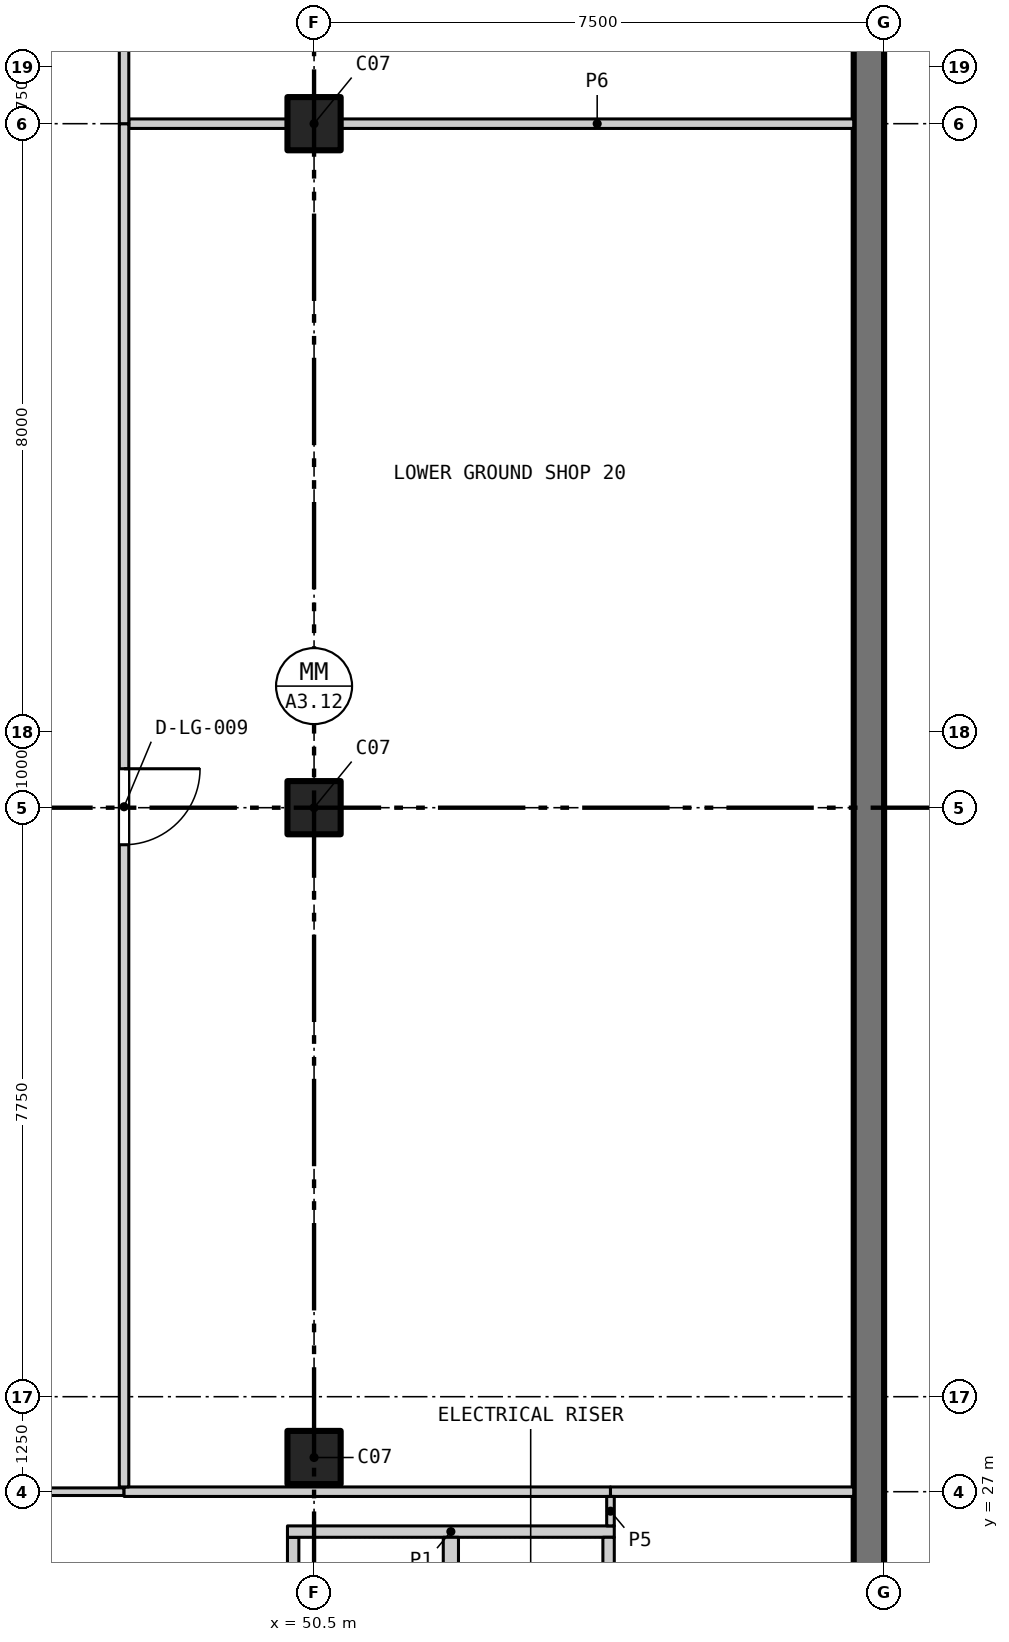
"""IFC4 building model, lengths in metres.
Left out: names, types, materials, properties, quantities, classifications, styles, units other than length and angle.
Written with IfcOpenShell. Run it as: python <this file> out.ifc"""

import sys

from ifc_helpers import new_model, si_unit, direction, frame, frame_2d, origin, origin_2d, place, context, subcontext, project, spatial, rectangle, extrude, element, fill, save


model = new_model("IFC4")
c1 = context("Model", 3, precision=1e-05, world=origin(), true_north=direction((0.0, 1.0)))
c2 = subcontext(c1, "Body", "Model", "MODEL_VIEW")
j1 = project(units=[si_unit("LENGTHUNIT", "METRE"), si_unit("PLANEANGLEUNIT", "RADIAN")], contexts=[c1])
p1 = place(None, origin())
s1 = spatial("IfcSite", under=j1, at=p1, CompositionType="ELEMENT")
p2 = place(p1, origin())
s2 = spatial("IfcBuilding", under=s1, at=p2, CompositionType="ELEMENT")
p3 = place(p2, frame((0.0, 0.0, -5.0)))
s3 = spatial("IfcBuildingStorey", under=s2, at=p3, CompositionType="ELEMENT", Elevation=-5.0)
for number, where, z_axis, x_axis in (
    (1, (50.5, 27.45, 0.0), (0.0, 0.0, 1.0), (1.0, 0.0, 0.0)),
    (2, (50.5, 36.0, 0.0), (0.0, 0.0, 1.0), (1.0, 0.0, 0.0)),
    (3, (50.5, 45.0, 0.0), (0.0, 0.0, 1.0), (1.0, 0.0, 0.0)),
):
    element("IfcColumn", number, at=place(p3, frame(where, z_axis=z_axis, x_axis=x_axis)), inside=s3, PredefinedType="COLUMN", context=c2, shape_type="SweptSolid", body=[
        extrude(rectangle(XDim=0.7, YDim=0.7, at=origin_2d()), origin(), (0.0, 0.0, 1.0), 5.0),
    ])
p4 = place(p3, frame((57.8, 18.0, 0.0), z_axis=(0.0, 0.0, 1.0), x_axis=(0.0, 1.0, 0.0)))
e4 = element("IfcWall", 4, at=p4, inside=s3, PredefinedType="SOLIDWALL", context=c2, shape_type="SweptSolid", body=[
    extrude(rectangle(XDim=108.0, YDim=0.4, at=frame_2d((54.0, 0.0))), origin(), (0.0, 0.0, 1.0), 5.0),
])
p5 = place(p3, frame((50.225, 24.4, 0.0), z_axis=(0.0, 0.0, 1.0), x_axis=(0.0, 1.0, 0.0)))
e5 = element("IfcWall", 5, at=p5, inside=s3, PredefinedType="PARTITIONING", context=c2, shape_type="SweptSolid", body=[
    extrude(rectangle(XDim=2.0, YDim=0.15, at=frame_2d((1.0, 0.0))), origin(), (0.0, 0.0, 1.0), 4.7),
])
p6 = place(p3, frame((50.15, 26.475, 0.0), z_axis=(0.0, 0.0, 1.0), x_axis=(1.0, 0.0, 0.0)))
e6 = element("IfcWall", 6, at=p6, inside=s3, PredefinedType="PARTITIONING", context=c2, shape_type="SweptSolid", body=[
    extrude(rectangle(XDim=4.3, YDim=0.15, at=frame_2d((2.15, 0.0))), origin(), (0.0, 0.0, 1.0), 3.3),
])
p7 = place(p3, frame((52.3, 24.4, 0.0), z_axis=(0.0, 0.0, 1.0), x_axis=(0.0, 1.0, 0.0)))
e7 = element("IfcWall", 7, at=p7, inside=s3, PredefinedType="PARTITIONING", context=c2, shape_type="SweptSolid", body=[
    extrude(rectangle(XDim=2.0, YDim=0.2, at=frame_2d((1.0, 0.0))), origin(), (0.0, 0.0, 1.0), 4.7),
])
p8 = place(p3, frame((54.375, 25.95, 0.0), z_axis=(0.0, 0.0, 1.0), x_axis=(0.0, 1.0, 0.0)))
e8 = element("IfcWall", 8, at=p8, inside=s3, PredefinedType="PARTITIONING", context=c2, shape_type="SweptSolid", body=[
    extrude(rectangle(XDim=0.45, YDim=0.15, at=frame_2d((0.225, 0.0))), origin(), (0.0, 0.0, 1.0), 4.7),
])
p9 = place(p3, frame((45.35, 27.0, 0.0), z_axis=(0.0, 0.0, 1.0), x_axis=(1.0, 0.0, 0.0)))
e9 = element("IfcWall", 9, at=p9, inside=s3, PredefinedType="PARTITIONING", context=c2, shape_type="SweptSolid", body=[
    extrude(rectangle(XDim=2.65, YDim=0.1, at=frame_2d((1.325, 0.0))), origin(), (0.0, 0.0, 1.0), 4.7),
])
p10 = place(p3, frame((48.0, 27.0, 0.0), z_axis=(0.0, 0.0, 1.0), x_axis=(1.0, 0.0, 0.0)))
e10 = element("IfcWall", 10, at=p10, inside=s3, PredefinedType="PARTITIONING", context=c2, shape_type="SweptSolid", body=[
    extrude(rectangle(XDim=6.4, YDim=0.125, at=frame_2d((3.2, 0.0))), origin(), (0.0, 0.0, 1.0), 4.7),
])
p11 = place(p3, frame((54.4, 27.0, 0.0), z_axis=(0.0, 0.0, 1.0), x_axis=(1.0, 0.0, 0.0)))
e11 = element("IfcWall", 11, at=p11, inside=s3, PredefinedType="PARTITIONING", context=c2, shape_type="SweptSolid", body=[
    extrude(rectangle(XDim=3.2, YDim=0.125, at=frame_2d((1.6, 0.0))), origin(), (0.0, 0.0, 1.0), 4.7),
])
p12 = place(p3, frame((48.062, 45.0, 0.0), z_axis=(0.0, 0.0, 1.0), x_axis=(1.0, 0.0, 0.0)))
e12 = element("IfcWall", 12, at=p12, inside=s3, PredefinedType="PARTITIONING", context=c2, shape_type="SweptSolid", body=[
    extrude(rectangle(XDim=2.087, YDim=0.125, at=frame_2d((1.044, 0.0))), origin(), (0.0, 0.0, 1.0), 4.0),
])
p13 = place(p3, frame((50.85, 45.0, 0.0), z_axis=(0.0, 0.0, 1.0), x_axis=(1.0, 0.0, 0.0)))
e13 = element("IfcWall", 13, at=p13, inside=s3, PredefinedType="PARTITIONING", context=c2, shape_type="SweptSolid", body=[
    extrude(rectangle(XDim=6.75, YDim=0.125, at=frame_2d((3.375, 0.0))), origin(), (0.0, 0.0, 1.0), 4.0),
])
p14 = place(p3, frame((48.0, 27.062, 0.0), z_axis=(0.0, 0.0, 1.0), x_axis=(0.0, 1.0, 0.0)))
e14 = element("IfcWall", 14, at=p14, inside=s3, PredefinedType="PARTITIONING", context=c2, shape_type="SweptSolid", body=[
    extrude(rectangle(XDim=17.938, YDim=0.125, at=frame_2d((8.969, 0.0))), origin(), (0.0, 0.0, 1.0), 4.7),
])
p15 = place(p14, frame((8.45, 0.0, 0.0)))
e15 = element("IfcOpeningElement", 15, at=p15, cuts=e14, PredefinedType="OPENING", context=c2, shape_type="SweptSolid", body=[
    extrude(rectangle(XDim=1.0, YDim=2.1, at=frame_2d((0.5, 1.05))), frame((0.0, 0.073, 0.0), z_axis=(0.0, -1.0, 0.0), x_axis=(1.0, 0.0, 0.0)), (0.0, 0.0, 1.0), 0.145),
])
p16 = place(p3, frame((48.0, 45.0, 0.0), z_axis=(0.0, 0.0, 1.0), x_axis=(0.0, 1.0, 0.0)))
e16 = element("IfcWall", 16, at=p16, inside=s3, PredefinedType="PARTITIONING", context=c2, shape_type="SweptSolid", body=[
    extrude(rectangle(XDim=18.0, YDim=0.125, at=frame_2d((9.0, 0.0))), origin(), (0.0, 0.0, 1.0), 4.7),
])
p17 = place(p16, frame((8.5, 0.0, 0.0)))
e17 = element("IfcOpeningElement", 17, at=p17, cuts=e16, PredefinedType="OPENING", context=c2, shape_type="SweptSolid", body=[
    extrude(rectangle(XDim=1.0, YDim=2.1, at=frame_2d((0.5, 1.05))), frame((0.0, 0.073, 0.0), z_axis=(0.0, -1.0, 0.0), x_axis=(1.0, 0.0, 0.0)), (0.0, 0.0, 1.0), 0.145),
])
p18 = place(p3, frame((54.4, 26.55, 0.0), z_axis=(0.0, 0.0, 1.0), x_axis=(0.0, 1.0, 0.0)))
e18 = element("IfcWall", 18, at=p18, inside=s3, PredefinedType="PARTITIONING", context=c2, shape_type="SweptSolid", body=[
    extrude(rectangle(XDim=0.387, YDim=0.1, at=frame_2d((0.194, 0.0))), origin(), (0.0, 0.0, 1.0), 4.7),
])
p19 = place(p15, frame((1.0, 0.0, 0.0), z_axis=(0.0, 0.0, 1.0), x_axis=(-1.0, 0.0, 0.0)))
e19 = element("IfcDoor", 19, at=p19, inside=s3, OperationType="SINGLE_SWING_LEFT", PredefinedType="DOOR", context=c2, shape_type="SweptSolid", body=[
    extrude(rectangle(XDim=1.0, YDim=2.1, at=frame_2d((0.5, 1.05))), frame((0.0, 0.025, 0.0), z_axis=(0.0, -1.0, 0.0), x_axis=(1.0, 0.0, 0.0)), (0.0, 0.0, 1.0), 0.05),
])
fill(e15, e19)
save(model, sys.argv[1])
